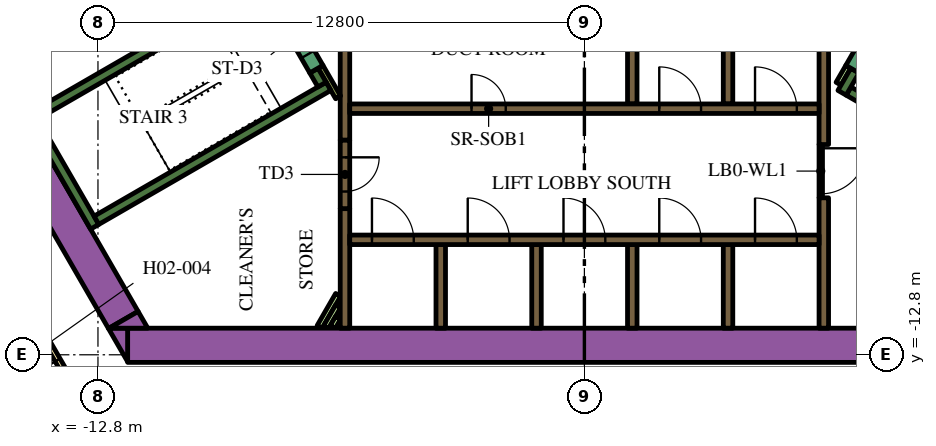
"""IFC4 building model, lengths in metres.
Left out: names, types, materials, properties, quantities, classifications, styles, units other than length and angle.
Written with IfcOpenShell. Run it as: python <this file> out.ifc"""

import sys

from ifc_helpers import new_model, si_unit, direction, frame, frame_2d, origin, place, context, subcontext, project, spatial, polyline, rectangle, outline, extrude, element, fill, save


model = new_model("IFC4")
c1 = context("Model", 3, precision=1e-05, world=origin(), true_north=direction((0.0, 1.0)))
c2 = subcontext(c1, "Body", "Model", "MODEL_VIEW")
j1 = project(units=[si_unit("LENGTHUNIT", "METRE"), si_unit("PLANEANGLEUNIT", "RADIAN")], contexts=[c1])
p1 = place(None, origin())
s1 = spatial("IfcSite", under=j1, at=p1, CompositionType="ELEMENT")
p2 = place(p1, origin())
s2 = spatial("IfcBuilding", under=s1, at=p2, CompositionType="ELEMENT")
p3 = place(p2, frame((0.0, 0.0, 39.3)))
s3 = spatial("IfcBuildingStorey", under=s2, at=p3, CompositionType="ELEMENT", Elevation=39.3)
p4 = place(p3, frame((-12.019, -12.55, 0.0), z_axis=(0.0, 0.0, 1.0), x_axis=(1.0, 0.0, 0.0)))
e1 = element("IfcWall", 1, at=p4, inside=s3, PredefinedType="SOLIDWALL", context=c2, shape_type="SweptSolid", body=[
    extrude(rectangle(XDim=21.63, YDim=0.9, at=frame_2d((10.815, 0.0))), origin(), (0.0, 0.0, 1.0), 3.9),
])
p5 = place(p3, origin())
e2 = element("IfcWall", 2, at=p5, inside=s3, PredefinedType="SOLIDWALL", context=c2, shape_type="SweptSolid", body=[
    extrude(outline(polyline([(-12.529, -12.1), (-12.021, -12.1), (-12.021, -12.98), (-12.529, -12.1)])), origin(), (0.0, 0.0, 1.0), 3.9),
])
p6 = place(p3, frame((-12.134, -11.883, 0.0), z_axis=(0.0, 0.0, 1.0), x_axis=(-0.500005339912, 0.866022320763, 0.0)))
e3 = element("IfcWall", 3, at=p6, inside=s3, PredefinedType="SOLIDWALL", context=c2, shape_type="SweptSolid", body=[
    extrude(rectangle(XDim=9.488, YDim=0.9, at=frame_2d((4.744, 0.0))), origin(), (0.0, 0.0, 1.0), 3.9),
])
e4 = element("IfcWall", 4, at=p5, inside=s3, PredefinedType="SOLIDWALL", context=c2, shape_type="SweptSolid", body=[
    extrude(outline(polyline([(-11.489, -12.1), (-12.505, -12.1), (-11.743, -11.66), (-11.489, -12.1)])), origin(), (0.0, 0.0, 1.0), 3.9),
])
p7 = place(p3, frame((12.84, -9.261, 0.0), z_axis=(0.0, 0.0, 1.0), x_axis=(-0.866013990052, 0.500019768644, 0.0)))
e5 = element("IfcWall", 5, at=p7, inside=s3, PredefinedType="SOLIDWALL", context=c2, shape_type="SweptSolid", body=[
    extrude(rectangle(XDim=6.8, YDim=0.25, at=frame_2d((3.4, 0.0))), origin(), (0.0, 0.0, 1.0), 3.9),
])
p8 = place(p3, frame((6.78, -5.906, 0.0), z_axis=(0.0, 0.0, 1.0), x_axis=(0.500223362819, 0.865896406789, 0.0)))
e6 = element("IfcWall", 6, at=p8, inside=s3, PredefinedType="SOLIDWALL", context=c2, shape_type="SweptSolid", body=[
    extrude(rectangle(XDim=0.675, YDim=0.25, at=frame_2d((0.337, 0.0))), origin(), (0.0, 0.0, 1.0), 3.9),
])
p9 = place(p3, frame((-12.885, -9.431, 0.0), z_axis=(0.0, 0.0, 1.0), x_axis=(-0.500020560727, 0.866013532718, 0.0)))
e7 = element("IfcWall", 7, at=p9, inside=s3, PredefinedType="SOLIDWALL", context=c2, shape_type="SweptSolid", body=[
    extrude(rectangle(XDim=3.45, YDim=0.25, at=frame_2d((1.725, 0.0))), origin(), (0.0, 0.0, 1.0), 3.9),
])
p10 = place(p3, frame((-14.44, -6.49, 0.0), z_axis=(0.0, 0.0, 1.0), x_axis=(0.866022966069, 0.500004222222, 0.0)))
e8 = element("IfcWall", 8, at=p10, inside=s3, PredefinedType="SOLIDWALL", context=c2, shape_type="SweptSolid", body=[
    extrude(rectangle(XDim=6.8, YDim=0.25, at=frame_2d((3.4, 0.0))), origin(), (0.0, 0.0, 1.0), 3.9),
])
p11 = place(p3, frame((-12.84, -9.261, 0.0), z_axis=(0.0, 0.0, 1.0), x_axis=(0.866016039709, 0.500016218704, 0.0)))
e9 = element("IfcWall", 9, at=p11, inside=s3, PredefinedType="SOLIDWALL", context=c2, shape_type="SweptSolid", body=[
    extrude(rectangle(XDim=7.05, YDim=0.25, at=frame_2d((3.525, 0.0))), origin(), (0.0, 0.0, 1.0), 3.9),
])
p12 = place(p3, frame((-6.905, -5.69, 0.0), z_axis=(0.0, 0.0, 1.0), x_axis=(-0.500402024738, 0.865793170242, 0.0)))
e10 = element("IfcWall", 10, at=p12, inside=s3, PredefinedType="SOLIDWALL", context=c2, shape_type="SweptSolid", body=[
    extrude(rectangle(XDim=0.425, YDim=0.25, at=frame_2d((0.212, 0.0))), origin(), (0.0, 0.0, 1.0), 3.9),
])
p13 = place(p3, frame((-3.78, -12.1, 0.0), z_axis=(0.0, 0.0, 1.0), x_axis=(0.0, 1.0, 0.0)))
e11 = element("IfcWall", 11, at=p13, inside=s3, PredefinedType="SOLIDWALL", context=c2, shape_type="SweptSolid", body=[
    extrude(rectangle(XDim=2.2, YDim=0.25, at=frame_2d((1.1, 0.0))), origin(), (0.0, 0.0, 1.0), 3.9),
])
p14 = place(p3, frame((-6.3, -12.1, 0.0), z_axis=(0.0, 0.0, 1.0), x_axis=(0.0, 1.0, 0.0)))
e12 = element("IfcWall", 12, at=p14, inside=s3, PredefinedType="SOLIDWALL", context=c2, shape_type="SweptSolid", body=[
    extrude(rectangle(XDim=3.146, YDim=0.25, at=frame_2d((1.573, 0.0))), origin(), (0.0, 0.0, 1.0), 3.9),
])
p15 = place(p3, frame((6.3, -8.67, 0.0), z_axis=(0.0, 0.0, 1.0), x_axis=(0.0, -1.0, 0.0)))
e13 = element("IfcWall", 13, at=p15, inside=s3, PredefinedType="SOLIDWALL", context=c2, shape_type="SweptSolid", body=[
    extrude(rectangle(XDim=3.43, YDim=0.25, at=frame_2d((1.715, 0.0))), origin(), (0.0, 0.0, 1.0), 3.9),
])
p16 = place(p3, frame((6.3, -7.268, 0.0), z_axis=(0.0, 0.0, 1.0), x_axis=(0.0, 1.0, 0.0)))
e14 = element("IfcWall", 14, at=p16, inside=s3, PredefinedType="SOLIDWALL", context=c2, shape_type="SweptSolid", body=[
    extrude(rectangle(XDim=3.268, YDim=0.25, at=frame_2d((1.634, 0.0))), origin(), (0.0, 0.0, 1.0), 3.9),
])
for number, where, z_axis, x_axis in (
    (15, (3.78, -4.0, 0.0), (0.0, 0.0, 1.0), (0.0, -1.0, 0.0)),
    (16, (1.26, -4.0, 0.0), (0.0, 0.0, 1.0), (0.0, -1.0, 0.0)),
):
    element("IfcWall", number, at=place(p3, frame(where, z_axis=z_axis, x_axis=x_axis)), inside=s3, PredefinedType="SOLIDWALL", context=c2, shape_type="SweptSolid", body=[
        extrude(rectangle(XDim=2.2, YDim=0.25, at=frame_2d((1.1, 0.0))), origin(), (0.0, 0.0, 1.0), 3.9),
    ])
p17 = place(p3, frame((-6.3, -4.0, 0.0), z_axis=(0.0, 0.0, 1.0), x_axis=(0.0, -1.0, 0.0)))
e17 = element("IfcWall", 17, at=p17, inside=s3, PredefinedType="SOLIDWALL", context=c2, shape_type="SweptSolid", body=[
    extrude(rectangle(XDim=3.154, YDim=0.25, at=frame_2d((1.577, 0.0))), origin(), (0.0, 0.0, 1.0), 3.9),
])
for number, where, z_axis, x_axis in (
    (18, (3.78, -12.1, 0.0), (0.0, 0.0, 1.0), (0.0, 1.0, 0.0)),
    (19, (1.26, -12.1, 0.0), (0.0, 0.0, 1.0), (0.0, 1.0, 0.0)),
    (20, (-1.26, -12.1, 0.0), (0.0, 0.0, 1.0), (0.0, 1.0, 0.0)),
):
    element("IfcWall", number, at=place(p3, frame(where, z_axis=z_axis, x_axis=x_axis)), inside=s3, PredefinedType="SOLIDWALL", context=c2, shape_type="SweptSolid", body=[
        extrude(rectangle(XDim=2.2, YDim=0.25, at=frame_2d((1.1, 0.0))), origin(), (0.0, 0.0, 1.0), 3.9),
    ])
p18 = place(p3, frame((-6.968, -12.068, 0.0), z_axis=(0.0, 0.0, 1.0), x_axis=(0.49998975084, 0.866031321059, 0.0)))
e21 = element("IfcWall", 21, at=p18, inside=s3, PredefinedType="PARTITIONING", context=c2, shape_type="SweptSolid", body=[
    extrude(rectangle(XDim=0.975, YDim=0.15, at=frame_2d((0.488, 0.0))), origin(), (0.0, 0.0, 1.0), 2.75),
])
p19 = place(p3, frame((-6.794, -12.068, 0.0), z_axis=(0.0, 0.0, 1.0), x_axis=(0.49985693963, 0.866107983974, 0.0)))
e22 = element("IfcWall", 22, at=p19, inside=s3, PredefinedType="PARTITIONING", context=c2, shape_type="SweptSolid", body=[
    extrude(rectangle(XDim=0.629, YDim=0.15, at=frame_2d((0.314, 0.0))), origin(), (0.0, 0.0, 1.0), 2.75),
])
p20 = place(p3, frame((-6.621, -12.068, 0.0), z_axis=(0.0, 0.0, 1.0), x_axis=(0.500046963369, 0.865998287773, 0.0)))
e23 = element("IfcWall", 23, at=p20, inside=s3, PredefinedType="PARTITIONING", context=c2, shape_type="SweptSolid", body=[
    extrude(rectangle(XDim=0.282, YDim=0.15, at=frame_2d((0.141, 0.0))), origin(), (0.0, 0.0, 1.0), 2.75),
])
p21 = place(p3, frame((-6.48, -6.027, 0.0), z_axis=(0.0, 0.0, 1.0), x_axis=(-0.499927229454, 0.866067413802, 0.0)))
e24 = element("IfcWall", 24, at=p21, inside=s3, PredefinedType="PARTITIONING", context=c2, shape_type="SweptSolid", body=[
    extrude(rectangle(XDim=0.929, YDim=0.15, at=frame_2d((0.464, 0.0))), origin(), (0.0, 0.0, 1.0), 3.9),
])
p22 = place(p3, frame((6.945, -5.222, 0.0), z_axis=(0.0, 0.0, 1.0), x_axis=(-0.499818422106, -0.866130212453, 0.0)))
e25 = element("IfcWall", 25, at=p22, inside=s3, PredefinedType="PARTITIONING", context=c2, shape_type="SweptSolid", body=[
    extrude(rectangle(XDim=0.514, YDim=0.15, at=frame_2d((0.257, 0.0))), origin(), (0.0, 0.0, 1.0), 2.75),
])
p23 = place(p3, frame((-6.175, -9.775, 0.0), z_axis=(0.0, 0.0, 1.0), x_axis=(1.0, 0.0, 0.0)))
e26 = element("IfcWall", 26, at=p23, inside=s3, PredefinedType="SOLIDWALL", context=c2, shape_type="SweptSolid", body=[
    extrude(rectangle(XDim=12.35, YDim=0.25, at=frame_2d((6.175, 0.0))), origin(), (0.0, 0.0, 1.0), 3.9),
])
p24 = place(p23, frame((0.585, 0.0, 0.0)))
e27 = element("IfcOpeningElement", 27, at=p24, cuts=e26, PredefinedType="OPENING", context=c2, shape_type="SweptSolid", body=[
    extrude(rectangle(XDim=1.1, YDim=2.1, at=frame_2d((0.55, 1.05))), frame((0.0, 0.135, 0.0), z_axis=(0.0, -1.0, 0.0), x_axis=(1.0, 0.0, 0.0)), (0.0, 0.0, 1.0), 0.27),
])
p25 = place(p23, frame((3.105, 0.0, 0.0)))
e28 = element("IfcOpeningElement", 28, at=p25, cuts=e26, PredefinedType="OPENING", context=c2, shape_type="SweptSolid", body=[
    extrude(rectangle(XDim=1.1, YDim=2.1, at=frame_2d((0.55, 1.05))), frame((0.0, 0.135, 0.0), z_axis=(0.0, -1.0, 0.0), x_axis=(1.0, 0.0, 0.0)), (0.0, 0.0, 1.0), 0.27),
])
p26 = place(p23, frame((5.625, 0.0, 0.0)))
e29 = element("IfcOpeningElement", 29, at=p26, cuts=e26, PredefinedType="OPENING", context=c2, shape_type="SweptSolid", body=[
    extrude(rectangle(XDim=1.1, YDim=2.1, at=frame_2d((0.55, 1.05))), frame((0.0, 0.135, 0.0), z_axis=(0.0, -1.0, 0.0), x_axis=(1.0, 0.0, 0.0)), (0.0, 0.0, 1.0), 0.27),
])
p27 = place(p23, frame((8.145, 0.0, 0.0)))
e30 = element("IfcOpeningElement", 30, at=p27, cuts=e26, PredefinedType="OPENING", context=c2, shape_type="SweptSolid", body=[
    extrude(rectangle(XDim=1.1, YDim=2.1, at=frame_2d((0.55, 1.05))), frame((0.0, 0.135, 0.0), z_axis=(0.0, -1.0, 0.0), x_axis=(1.0, 0.0, 0.0)), (0.0, 0.0, 1.0), 0.27),
])
p28 = place(p23, frame((10.665, 0.0, 0.0)))
e31 = element("IfcOpeningElement", 31, at=p28, cuts=e26, PredefinedType="OPENING", context=c2, shape_type="SweptSolid", body=[
    extrude(rectangle(XDim=1.1, YDim=2.1, at=frame_2d((0.55, 1.05))), frame((0.0, 0.135, 0.0), z_axis=(0.0, -1.0, 0.0), x_axis=(1.0, 0.0, 0.0)), (0.0, 0.0, 1.0), 0.27),
])
p29 = place(p3, frame((-6.175, -6.325, 0.0), z_axis=(0.0, 0.0, 1.0), x_axis=(1.0, 0.0, 0.0)))
e32 = element("IfcWall", 32, at=p29, inside=s3, PredefinedType="SOLIDWALL", context=c2, shape_type="SweptSolid", body=[
    extrude(rectangle(XDim=12.35, YDim=0.25, at=frame_2d((6.175, 0.0))), origin(), (0.0, 0.0, 1.0), 3.9),
])
p30 = place(p29, frame((3.205, 0.0, 0.0)))
e33 = element("IfcOpeningElement", 33, at=p30, cuts=e32, PredefinedType="OPENING", context=c2, shape_type="SweptSolid", body=[
    extrude(rectangle(XDim=0.9, YDim=2.1, at=frame_2d((0.45, 1.05))), frame((0.0, 0.135, 0.0), z_axis=(0.0, -1.0, 0.0), x_axis=(1.0, 0.0, 0.0)), (0.0, 0.0, 1.0), 0.27),
])
p31 = place(p29, frame((8.145, 0.0, 0.0)))
e34 = element("IfcOpeningElement", 34, at=p31, cuts=e32, PredefinedType="OPENING", context=c2, shape_type="SweptSolid", body=[
    extrude(rectangle(XDim=1.1, YDim=2.1, at=frame_2d((0.55, 1.05))), frame((0.0, 0.135, 0.0), z_axis=(0.0, -1.0, 0.0), x_axis=(1.0, 0.0, 0.0)), (0.0, 0.0, 1.0), 0.27),
])
p32 = place(p29, frame((10.665, 0.0, 0.0)))
e35 = element("IfcOpeningElement", 35, at=p32, cuts=e32, PredefinedType="OPENING", context=c2, shape_type="SweptSolid", body=[
    extrude(rectangle(XDim=1.1, YDim=2.1, at=frame_2d((0.55, 1.05))), frame((0.0, 0.135, 0.0), z_axis=(0.0, -1.0, 0.0), x_axis=(1.0, 0.0, 0.0)), (0.0, 0.0, 1.0), 0.27),
])
p33 = place(p3, frame((7.053, -5.284, 0.0), z_axis=(0.0, 0.0, 1.0), x_axis=(0.500078061341, 0.865980330357, 0.0)))
e36 = element("IfcWall", 36, at=p33, inside=s3, PredefinedType="SOLIDWALL", context=c2, shape_type="SweptSolid", body=[
    extrude(rectangle(XDim=2.1, YDim=0.4, at=frame_2d((1.05, 0.0))), origin(), (0.0, 0.0, 1.0), 3.9),
])
p34 = place(p33, frame((0.45, 0.0, 0.0)))
e37 = element("IfcOpeningElement", 37, at=p34, cuts=e36, PredefinedType="OPENING", context=c2, shape_type="SweptSolid", body=[
    extrude(rectangle(XDim=1.2, YDim=2.1, at=frame_2d((0.6, 1.05))), frame((0.0, 0.21, 0.0), z_axis=(0.0, -1.0, 0.0), x_axis=(1.0, 0.0, 0.0)), (0.0, 0.0, 1.0), 0.42),
])
p35 = place(p3, frame((-8.103, -3.466, 0.0), z_axis=(0.0, 0.0, 1.0), x_axis=(0.500078061341, -0.865980330357, 0.0)))
e38 = element("IfcWall", 38, at=p35, inside=s3, PredefinedType="SOLIDWALL", context=c2, shape_type="SweptSolid", body=[
    extrude(rectangle(XDim=2.1, YDim=0.4, at=frame_2d((1.05, 0.0))), origin(), (0.0, 0.0, 1.0), 3.9),
])
p36 = place(p35, frame((0.45, 0.0, 0.0)))
e39 = element("IfcOpeningElement", 39, at=p36, cuts=e38, PredefinedType="OPENING", context=c2, shape_type="SweptSolid", body=[
    extrude(rectangle(XDim=1.2, YDim=2.1, at=frame_2d((0.6, 1.05))), frame((0.0, 0.21, 0.0), z_axis=(0.0, -1.0, 0.0), x_axis=(1.0, 0.0, 0.0)), (0.0, 0.0, 1.0), 0.42),
])
p37 = place(p3, frame((-6.3, -7.154, 0.0), z_axis=(0.0, 0.0, 1.0), x_axis=(0.0, -1.0, 0.0)))
e40 = element("IfcWall", 40, at=p37, inside=s3, PredefinedType="SOLIDWALL", context=c2, shape_type="SweptSolid", body=[
    extrude(rectangle(XDim=1.8, YDim=0.25, at=frame_2d((0.9, 0.0))), origin(), (0.0, 0.0, 1.0), 3.9),
])
p38 = place(p37, frame((0.45, 0.0, 0.0)))
e41 = element("IfcOpeningElement", 41, at=p38, cuts=e40, PredefinedType="OPENING", context=c2, shape_type="SweptSolid", body=[
    extrude(rectangle(XDim=0.9, YDim=2.1, at=frame_2d((0.45, 1.05))), frame((0.0, 0.135, 0.0), z_axis=(0.0, -1.0, 0.0), x_axis=(1.0, 0.0, 0.0)), (0.0, 0.0, 1.0), 0.27),
])
p39 = place(p3, frame((6.22, -7.266, 0.0), z_axis=(0.0, 0.0, 1.0), x_axis=(0.0, -1.0, 0.0)))
e42 = element("IfcWall", 42, at=p39, inside=s3, PredefinedType="PARTITIONING", context=c2, shape_type="SweptSolid", body=[
    extrude(rectangle(XDim=1.4, YDim=0.09, at=frame_2d((0.7, 0.0))), origin(), (0.0, 0.0, 1.0), 2.75),
])
p40 = place(p39, frame((0.1, 0.0, 0.0)))
e43 = element("IfcOpeningElement", 43, at=p40, cuts=e42, PredefinedType="OPENING", context=c2, shape_type="SweptSolid", body=[
    extrude(rectangle(XDim=1.2, YDim=2.1, at=frame_2d((0.6, 1.05))), frame((0.0, 0.055, 0.0), z_axis=(0.0, -1.0, 0.0), x_axis=(1.0, 0.0, 0.0)), (0.0, 0.0, 1.0), 0.11),
])
p41 = place(p3, frame((-12.918, -14.575, 0.0), z_axis=(0.0, 0.0, 1.0), x_axis=(-0.500009150678, 0.866020120573, 0.0)))
e44 = element("IfcWall", 44, at=p41, inside=s3, PredefinedType="PARTITIONING", context=c2, shape_type="SweptSolid", body=[
    extrude(rectangle(XDim=5.258, YDim=0.15, at=frame_2d((2.629, 0.0))), origin(), (0.0, 0.0, 1.0), 2.75),
])
p42 = place(p41, frame((1.888, 0.0, 0.0)))
e45 = element("IfcOpeningElement", 45, at=p42, cuts=e44, PredefinedType="OPENING", context=c2, shape_type="SweptSolid", body=[
    extrude(rectangle(XDim=1.0, YDim=2.1, at=frame_2d((0.5, 1.05))), frame((0.0, 0.085, 0.0), z_axis=(0.0, -1.0, 0.0), x_axis=(1.0, 0.0, 0.0)), (0.0, 0.0, 1.0), 0.17),
])
p43 = place(p24, origin())
e46 = element("IfcDoor", 46, at=p43, inside=s3, OperationType="DOUBLE_DOOR_SLIDING", PredefinedType="DOOR", context=c2, shape_type="SweptSolid", body=[
    extrude(rectangle(XDim=1.1, YDim=2.1, at=frame_2d((0.55, 1.05))), frame((0.0, 0.025, 0.0), z_axis=(0.0, -1.0, 0.0), x_axis=(1.0, 0.0, 0.0)), (0.0, 0.0, 1.0), 0.05),
])
fill(e27, e46)
p44 = place(p25, origin())
e47 = element("IfcDoor", 47, at=p44, inside=s3, OperationType="DOUBLE_DOOR_SLIDING", PredefinedType="DOOR", context=c2, shape_type="SweptSolid", body=[
    extrude(rectangle(XDim=1.1, YDim=2.1, at=frame_2d((0.55, 1.05))), frame((0.0, 0.025, 0.0), z_axis=(0.0, -1.0, 0.0), x_axis=(1.0, 0.0, 0.0)), (0.0, 0.0, 1.0), 0.05),
])
fill(e28, e47)
p45 = place(p26, origin())
e48 = element("IfcDoor", 48, at=p45, inside=s3, OperationType="DOUBLE_DOOR_SLIDING", PredefinedType="DOOR", context=c2, shape_type="SweptSolid", body=[
    extrude(rectangle(XDim=1.1, YDim=2.1, at=frame_2d((0.55, 1.05))), frame((0.0, 0.025, 0.0), z_axis=(0.0, -1.0, 0.0), x_axis=(1.0, 0.0, 0.0)), (0.0, 0.0, 1.0), 0.05),
])
fill(e29, e48)
p46 = place(p27, origin())
e49 = element("IfcDoor", 49, at=p46, inside=s3, OperationType="DOUBLE_DOOR_SLIDING", PredefinedType="DOOR", context=c2, shape_type="SweptSolid", body=[
    extrude(rectangle(XDim=1.1, YDim=2.1, at=frame_2d((0.55, 1.05))), frame((0.0, 0.025, 0.0), z_axis=(0.0, -1.0, 0.0), x_axis=(1.0, 0.0, 0.0)), (0.0, 0.0, 1.0), 0.05),
])
fill(e30, e49)
p47 = place(p28, origin())
e50 = element("IfcDoor", 50, at=p47, inside=s3, OperationType="DOUBLE_DOOR_SLIDING", PredefinedType="DOOR", context=c2, shape_type="SweptSolid", body=[
    extrude(rectangle(XDim=1.1, YDim=2.1, at=frame_2d((0.55, 1.05))), frame((0.0, 0.025, 0.0), z_axis=(0.0, -1.0, 0.0), x_axis=(1.0, 0.0, 0.0)), (0.0, 0.0, 1.0), 0.05),
])
fill(e31, e50)
p48 = place(p30, origin())
e51 = element("IfcDoor", 51, at=p48, inside=s3, OperationType="SINGLE_SWING_LEFT", PredefinedType="DOOR", context=c2, shape_type="SweptSolid", body=[
    extrude(rectangle(XDim=0.9, YDim=2.1, at=frame_2d((0.45, 1.05))), frame((0.0, 0.025, 0.0), z_axis=(0.0, -1.0, 0.0), x_axis=(1.0, 0.0, 0.0)), (0.0, 0.0, 1.0), 0.05),
])
fill(e33, e51)
p49 = place(p31, origin())
e52 = element("IfcDoor", 52, at=p49, inside=s3, OperationType="DOUBLE_DOOR_SLIDING", PredefinedType="DOOR", context=c2, shape_type="SweptSolid", body=[
    extrude(rectangle(XDim=1.1, YDim=2.1, at=frame_2d((0.55, 1.05))), frame((0.0, 0.025, 0.0), z_axis=(0.0, -1.0, 0.0), x_axis=(1.0, 0.0, 0.0)), (0.0, 0.0, 1.0), 0.05),
])
fill(e34, e52)
p50 = place(p32, origin())
e53 = element("IfcDoor", 53, at=p50, inside=s3, OperationType="DOUBLE_DOOR_SLIDING", PredefinedType="DOOR", context=c2, shape_type="SweptSolid", body=[
    extrude(rectangle(XDim=1.1, YDim=2.1, at=frame_2d((0.55, 1.05))), frame((0.0, 0.025, 0.0), z_axis=(0.0, -1.0, 0.0), x_axis=(1.0, 0.0, 0.0)), (0.0, 0.0, 1.0), 0.05),
])
fill(e35, e53)
p51 = place(p36, origin())
e54 = element("IfcDoor", 54, at=p51, inside=s3, OperationType="SINGLE_SWING_LEFT", PredefinedType="DOOR", context=c2, shape_type="SweptSolid", body=[
    extrude(rectangle(XDim=1.2, YDim=2.1, at=frame_2d((0.6, 1.05))), frame((0.0, 0.025, 0.0), z_axis=(0.0, -1.0, 0.0), x_axis=(1.0, 0.0, 0.0)), (0.0, 0.0, 1.0), 0.05),
])
fill(e39, e54)
p52 = place(p38, origin())
e55 = element("IfcDoor", 55, at=p52, inside=s3, OperationType="SINGLE_SWING_LEFT", PredefinedType="DOOR", context=c2, shape_type="SweptSolid", body=[
    extrude(rectangle(XDim=0.9, YDim=2.1, at=frame_2d((0.45, 1.05))), frame((0.0, 0.025, 0.0), z_axis=(0.0, -1.0, 0.0), x_axis=(1.0, 0.0, 0.0)), (0.0, 0.0, 1.0), 0.05),
])
fill(e41, e55)
p53 = place(p40, origin())
e56 = element("IfcDoor", 56, at=p53, inside=s3, OperationType="SINGLE_SWING_LEFT", PredefinedType="DOOR", context=c2, shape_type="SweptSolid", body=[
    extrude(rectangle(XDim=1.2, YDim=2.1, at=frame_2d((0.6, 1.05))), frame((0.0, 0.025, 0.0), z_axis=(0.0, -1.0, 0.0), x_axis=(1.0, 0.0, 0.0)), (0.0, 0.0, 1.0), 0.05),
])
fill(e43, e56)
p54 = place(p42, origin())
e57 = element("IfcDoor", 57, at=p54, inside=s3, OperationType="SINGLE_SWING_LEFT", PredefinedType="DOOR", context=c2, shape_type="SweptSolid", body=[
    extrude(rectangle(XDim=1.0, YDim=2.1, at=frame_2d((0.5, 1.05))), frame((0.0, 0.025, 0.0), z_axis=(0.0, -1.0, 0.0), x_axis=(1.0, 0.0, 0.0)), (0.0, 0.0, 1.0), 0.05),
])
fill(e45, e57)
save(model, sys.argv[1])
